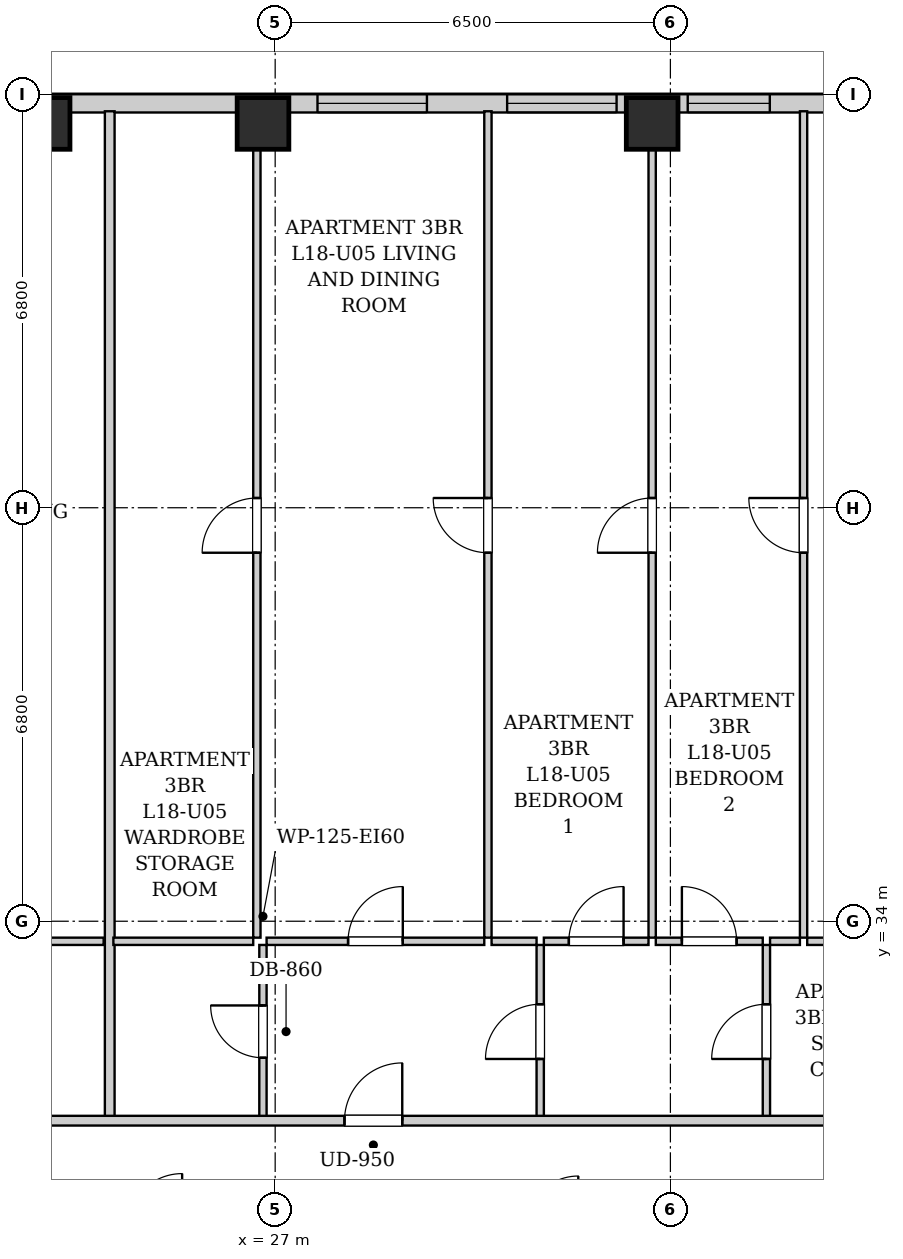
"""IFC4 building model, lengths in metres.
Left out: names, types, materials, properties, quantities, classifications, styles, units other than length and angle.
Written with IfcOpenShell. Run it as: python <this file> out.ifc"""

import sys

from ifc_helpers import new_model, si_unit, direction, frame, frame_2d, origin, origin_2d, place, context, subcontext, project, spatial, rectangle, extrude, element, fill, save


model = new_model("IFC4")
c1 = context("Model", 3, precision=1e-05, world=origin(), true_north=direction((0.0, 1.0)))
c2 = subcontext(c1, "Body", "Model", "MODEL_VIEW")
j1 = project(units=[si_unit("LENGTHUNIT", "METRE"), si_unit("PLANEANGLEUNIT", "RADIAN")], contexts=[c1])
p1 = place(None, origin())
s1 = spatial("IfcSite", under=j1, at=p1, CompositionType="ELEMENT")
p2 = place(p1, origin())
s2 = spatial("IfcBuilding", under=s1, at=p2, CompositionType="ELEMENT")
p3 = place(p2, frame((0.0, 0.0, 67.4)))
s3 = spatial("IfcBuildingStorey", under=s2, at=p3, CompositionType="ELEMENT", Elevation=67.4)
for number, where, z_axis, x_axis in (
    (1, (23.2, 47.12, 0.0), (0.0, 0.0, 1.0), (1.0, 0.0, 0.0)),
    (2, (26.8, 47.12, 0.0), (0.0, 0.0, 1.0), (1.0, 0.0, 0.0)),
    (3, (33.2, 47.12, 0.0), (0.0, 0.0, 1.0), (1.0, 0.0, 0.0)),
):
    element("IfcColumn", number, at=place(p3, frame(where, z_axis=z_axis, x_axis=x_axis)), inside=s3, PredefinedType="COLUMN", context=c2, shape_type="SweptSolid", body=[
        extrude(rectangle(XDim=0.85, YDim=0.85, at=origin_2d()), origin(), (0.0, 0.0, 1.0), 3.2),
    ])
p4 = place(p3, frame((10.0, 47.45, 0.0), z_axis=(0.0, 0.0, 1.0), x_axis=(1.0, 0.0, 0.0)))
e4 = element("IfcWall", 4, at=p4, inside=s3, PredefinedType="SOLIDWALL", context=c2, shape_type="SweptSolid", body=[
    extrude(rectangle(XDim=26.35, YDim=0.3, at=frame_2d((13.175, 0.0))), origin(), (0.0, 0.0, 1.0), 1.915),
])
p5 = place(p4, frame((1.735, 0.0, 0.55)))
e5 = element("IfcOpeningElement", 5, at=p5, cuts=e4, PredefinedType="OPENING", context=c2, shape_type="SweptSolid", body=[
    extrude(rectangle(XDim=1.8, YDim=1.2, at=frame_2d((0.9, 0.6))), frame((0.0, 0.16, 0.0), z_axis=(0.0, -1.0, 0.0), x_axis=(1.0, 0.0, 0.0)), (0.0, 0.0, 1.0), 0.32),
])
p6 = place(p4, frame((5.415, 0.0, 0.55)))
e6 = element("IfcOpeningElement", 6, at=p6, cuts=e4, PredefinedType="OPENING", context=c2, shape_type="SweptSolid", body=[
    extrude(rectangle(XDim=1.8, YDim=1.2, at=frame_2d((0.9, 0.6))), frame((0.0, 0.16, 0.0), z_axis=(0.0, -1.0, 0.0), x_axis=(1.0, 0.0, 0.0)), (0.0, 0.0, 1.0), 0.32),
])
p7 = place(p4, frame((10.618, 0.0, 0.55)))
e7 = element("IfcOpeningElement", 7, at=p7, cuts=e4, PredefinedType="OPENING", context=c2, shape_type="SweptSolid", body=[
    extrude(rectangle(XDim=1.8, YDim=1.2, at=frame_2d((0.9, 0.6))), frame((0.0, 0.16, 0.0), z_axis=(0.0, -1.0, 0.0), x_axis=(1.0, 0.0, 0.0)), (0.0, 0.0, 1.0), 0.32),
])
p8 = place(p4, frame((17.696, 0.0, 0.55)))
e8 = element("IfcOpeningElement", 8, at=p8, cuts=e4, PredefinedType="OPENING", context=c2, shape_type="SweptSolid", body=[
    extrude(rectangle(XDim=1.8, YDim=1.2, at=frame_2d((0.9, 0.6))), frame((0.0, 0.16, 0.0), z_axis=(0.0, -1.0, 0.0), x_axis=(1.0, 0.0, 0.0)), (0.0, 0.0, 1.0), 0.32),
])
p9 = place(p4, frame((20.815, 0.0, 0.55)))
e9 = element("IfcOpeningElement", 9, at=p9, cuts=e4, PredefinedType="OPENING", context=c2, shape_type="SweptSolid", body=[
    extrude(rectangle(XDim=1.8, YDim=1.2, at=frame_2d((0.9, 0.6))), frame((0.0, 0.16, 0.0), z_axis=(0.0, -1.0, 0.0), x_axis=(1.0, 0.0, 0.0)), (0.0, 0.0, 1.0), 0.32),
])
p10 = place(p4, frame((23.785, 0.0, 0.55)))
e10 = element("IfcOpeningElement", 10, at=p10, cuts=e4, PredefinedType="OPENING", context=c2, shape_type="SweptSolid", body=[
    extrude(rectangle(XDim=1.35, YDim=1.2, at=frame_2d((0.675, 0.6))), frame((0.0, 0.16, 0.0), z_axis=(0.0, -1.0, 0.0), x_axis=(1.0, 0.0, 0.0)), (0.0, 0.0, 1.0), 0.32),
])
p11 = place(p3, frame((20.826, 33.67, 0.0), z_axis=(0.0, 0.0, 1.0), x_axis=(1.0, 0.0, 0.0)))
e11 = element("IfcWall", 11, at=p11, inside=s3, PredefinedType="PARTITIONING", context=c2, shape_type="SweptSolid", body=[
    extrude(rectangle(XDim=3.353, YDim=0.12, at=frame_2d((1.677, 0.0))), origin(), (0.0, 0.0, 1.0), 2.88),
])
p12 = place(p11, frame((1.226, 0.0, 0.0)))
e12 = element("IfcOpeningElement", 12, at=p12, cuts=e11, PredefinedType="OPENING", context=c2, shape_type="SweptSolid", body=[
    extrude(rectangle(XDim=0.9, YDim=2.05, at=frame_2d((0.45, 1.025))), frame((0.0, 0.07, 0.0), z_axis=(0.0, -1.0, 0.0), x_axis=(1.0, 0.0, 0.0)), (0.0, 0.0, 1.0), 0.14),
])
p13 = place(p3, frame((24.279, 30.76, 0.0), z_axis=(0.0, 0.0, 1.0), x_axis=(0.0, 1.0, 0.0)))
e13 = element("IfcWall", 13, at=p13, inside=s3, PredefinedType="PARTITIONING", context=c2, shape_type="SweptSolid", body=[
    extrude(rectangle(XDim=16.56, YDim=0.16, at=frame_2d((8.28, 0.0))), origin(), (0.0, 0.0, 1.0), 2.88),
])
p14 = place(p3, frame((26.799, 30.76, 0.0), z_axis=(0.0, 0.0, 1.0), x_axis=(0.0, 1.0, 0.0)))
e14 = element("IfcWall", 14, at=p14, inside=s3, PredefinedType="PARTITIONING", context=c2, shape_type="SweptSolid", body=[
    extrude(rectangle(XDim=2.85, YDim=0.12, at=frame_2d((1.425, 0.0))), origin(), (0.0, 0.0, 1.0), 2.88),
])
p15 = place(p14, frame((0.995, 0.0, 0.0)))
e15 = element("IfcOpeningElement", 15, at=p15, cuts=e14, PredefinedType="OPENING", context=c2, shape_type="SweptSolid", body=[
    extrude(rectangle(XDim=0.86, YDim=2.05, at=frame_2d((0.43, 1.025))), frame((0.0, 0.07, 0.0), z_axis=(0.0, -1.0, 0.0), x_axis=(1.0, 0.0, 0.0)), (0.0, 0.0, 1.0), 0.14),
])
p16 = place(p3, frame((24.339, 33.67, 0.0), z_axis=(0.0, 0.0, 1.0), x_axis=(1.0, 0.0, 0.0)))
e16 = element("IfcWall", 16, at=p16, inside=s3, PredefinedType="PARTITIONING", context=c2, shape_type="SweptSolid", body=[
    extrude(rectangle(XDim=2.3, YDim=0.12, at=frame_2d((1.15, 0.0))), origin(), (0.0, 0.0, 1.0), 2.88),
])
p17 = place(p3, frame((31.359, 30.76, 0.0), z_axis=(0.0, 0.0, 1.0), x_axis=(0.0, 1.0, 0.0)))
e17 = element("IfcWall", 17, at=p17, inside=s3, PredefinedType="PARTITIONING", context=c2, shape_type="SweptSolid", body=[
    extrude(rectangle(XDim=2.85, YDim=0.12, at=frame_2d((1.425, 0.0))), origin(), (0.0, 0.0, 1.0), 2.88),
])
p18 = place(p17, frame((0.975, 0.0, 0.0)))
e18 = element("IfcOpeningElement", 18, at=p18, cuts=e17, PredefinedType="OPENING", context=c2, shape_type="SweptSolid", body=[
    extrude(rectangle(XDim=0.9, YDim=2.05, at=frame_2d((0.45, 1.025))), frame((0.0, 0.07, 0.0), z_axis=(0.0, -1.0, 0.0), x_axis=(1.0, 0.0, 0.0)), (0.0, 0.0, 1.0), 0.14),
])
p19 = place(p3, frame((26.859, 33.67, 0.0), z_axis=(0.0, 0.0, 1.0), x_axis=(1.0, 0.0, 0.0)))
e19 = element("IfcWall", 19, at=p19, inside=s3, PredefinedType="PARTITIONING", context=c2, shape_type="SweptSolid", body=[
    extrude(rectangle(XDim=3.58, YDim=0.12, at=frame_2d((1.79, 0.0))), origin(), (0.0, 0.0, 1.0), 2.88),
])
p20 = place(p19, frame((1.34, 0.0, 0.0)))
e20 = element("IfcOpeningElement", 20, at=p20, cuts=e19, PredefinedType="OPENING", context=c2, shape_type="SweptSolid", body=[
    extrude(rectangle(XDim=0.9, YDim=2.05, at=frame_2d((0.45, 1.025))), frame((0.0, 0.07, 0.0), z_axis=(0.0, -1.0, 0.0), x_axis=(1.0, 0.0, 0.0)), (0.0, 0.0, 1.0), 0.14),
])
p21 = place(p3, frame((30.559, 33.67, 0.0), z_axis=(0.0, 0.0, 1.0), x_axis=(1.0, 0.0, 0.0)))
e21 = element("IfcWall", 21, at=p21, inside=s3, PredefinedType="PARTITIONING", context=c2, shape_type="SweptSolid", body=[
    extrude(rectangle(XDim=0.74, YDim=0.12, at=frame_2d((0.37, 0.0))), origin(), (0.0, 0.0, 1.0), 2.88),
])
p22 = place(p3, frame((35.079, 30.76, 0.0), z_axis=(0.0, 0.0, 1.0), x_axis=(0.0, 1.0, 0.0)))
e22 = element("IfcWall", 22, at=p22, inside=s3, PredefinedType="PARTITIONING", context=c2, shape_type="SweptSolid", body=[
    extrude(rectangle(XDim=2.85, YDim=0.12, at=frame_2d((1.425, 0.0))), origin(), (0.0, 0.0, 1.0), 2.88),
])
p23 = place(p22, frame((0.975, 0.0, 0.0)))
e23 = element("IfcOpeningElement", 23, at=p23, cuts=e22, PredefinedType="OPENING", context=c2, shape_type="SweptSolid", body=[
    extrude(rectangle(XDim=0.9, YDim=2.05, at=frame_2d((0.45, 1.025))), frame((0.0, 0.07, 0.0), z_axis=(0.0, -1.0, 0.0), x_axis=(1.0, 0.0, 0.0)), (0.0, 0.0, 1.0), 0.14),
])
p24 = place(p3, frame((31.419, 33.67, 0.0), z_axis=(0.0, 0.0, 1.0), x_axis=(1.0, 0.0, 0.0)))
e24 = element("IfcWall", 24, at=p24, inside=s3, PredefinedType="PARTITIONING", context=c2, shape_type="SweptSolid", body=[
    extrude(rectangle(XDim=1.721, YDim=0.12, at=frame_2d((0.86, 0.0))), origin(), (0.0, 0.0, 1.0), 2.88),
])
p25 = place(p24, frame((0.411, 0.0, 0.0)))
e25 = element("IfcOpeningElement", 25, at=p25, cuts=e24, PredefinedType="OPENING", context=c2, shape_type="SweptSolid", body=[
    extrude(rectangle(XDim=0.9, YDim=2.05, at=frame_2d((0.45, 1.025))), frame((0.0, 0.07, 0.0), z_axis=(0.0, -1.0, 0.0), x_axis=(1.0, 0.0, 0.0)), (0.0, 0.0, 1.0), 0.14),
])
p26 = place(p3, frame((33.26, 33.67, 0.0), z_axis=(0.0, 0.0, 1.0), x_axis=(1.0, 0.0, 0.0)))
e26 = element("IfcWall", 26, at=p26, inside=s3, PredefinedType="PARTITIONING", context=c2, shape_type="SweptSolid", body=[
    extrude(rectangle(XDim=1.759, YDim=0.12, at=frame_2d((0.879, 0.0))), origin(), (0.0, 0.0, 1.0), 2.88),
])
p27 = place(p26, frame((0.429, 0.0, 0.0)))
e27 = element("IfcOpeningElement", 27, at=p27, cuts=e26, PredefinedType="OPENING", context=c2, shape_type="SweptSolid", body=[
    extrude(rectangle(XDim=0.9, YDim=2.05, at=frame_2d((0.45, 1.025))), frame((0.0, 0.07, 0.0), z_axis=(0.0, -1.0, 0.0), x_axis=(1.0, 0.0, 0.0)), (0.0, 0.0, 1.0), 0.14),
])
p28 = place(p3, frame((35.139, 33.67, 0.0), z_axis=(0.0, 0.0, 1.0), x_axis=(1.0, 0.0, 0.0)))
e28 = element("IfcWall", 28, at=p28, inside=s3, PredefinedType="PARTITIONING", context=c2, shape_type="SweptSolid", body=[
    extrude(rectangle(XDim=0.491, YDim=0.12, at=frame_2d((0.246, 0.0))), origin(), (0.0, 0.0, 1.0), 2.88),
])
p29 = place(p3, frame((35.75, 33.67, 0.0), z_axis=(0.0, 0.0, 1.0), x_axis=(1.0, 0.0, 0.0)))
e29 = element("IfcWall", 29, at=p29, inside=s3, PredefinedType="PARTITIONING", context=c2, shape_type="SweptSolid", body=[
    extrude(rectangle(XDim=2.37, YDim=0.12, at=frame_2d((1.185, 0.0))), origin(), (0.0, 0.0, 1.0), 2.88),
])
p30 = place(p29, frame((0.735, 0.0, 0.0)))
e30 = element("IfcOpeningElement", 30, at=p30, cuts=e29, PredefinedType="OPENING", context=c2, shape_type="SweptSolid", body=[
    extrude(rectangle(XDim=0.9, YDim=2.05, at=frame_2d((0.45, 1.025))), frame((0.0, 0.07, 0.0), z_axis=(0.0, -1.0, 0.0), x_axis=(1.0, 0.0, 0.0)), (0.0, 0.0, 1.0), 0.14),
])
p31 = place(p3, frame((26.699, 33.73, 0.0), z_axis=(0.0, 0.0, 1.0), x_axis=(0.0, 1.0, 0.0)))
e31 = element("IfcWall", 31, at=p31, inside=s3, PredefinedType="PARTITIONING", context=c2, shape_type="SweptSolid", body=[
    extrude(rectangle(XDim=13.59, YDim=0.12, at=frame_2d((6.795, 0.0))), origin(), (0.0, 0.0, 1.0), 2.88),
])
p32 = place(p31, frame((6.33, 0.0, 0.0)))
e32 = element("IfcOpeningElement", 32, at=p32, cuts=e31, PredefinedType="OPENING", context=c2, shape_type="SweptSolid", body=[
    extrude(rectangle(XDim=0.9, YDim=2.05, at=frame_2d((0.45, 1.025))), frame((0.0, 0.07, 0.0), z_axis=(0.0, -1.0, 0.0), x_axis=(1.0, 0.0, 0.0)), (0.0, 0.0, 1.0), 0.14),
])
p33 = place(p3, frame((30.499, 33.73, 0.0), z_axis=(0.0, 0.0, 1.0), x_axis=(0.0, 1.0, 0.0)))
e33 = element("IfcWall", 33, at=p33, inside=s3, PredefinedType="PARTITIONING", context=c2, shape_type="SweptSolid", body=[
    extrude(rectangle(XDim=13.59, YDim=0.12, at=frame_2d((6.795, 0.0))), origin(), (0.0, 0.0, 1.0), 2.88),
])
p34 = place(p33, frame((6.33, 0.0, 0.0)))
e34 = element("IfcOpeningElement", 34, at=p34, cuts=e33, PredefinedType="OPENING", context=c2, shape_type="SweptSolid", body=[
    extrude(rectangle(XDim=0.9, YDim=2.05, at=frame_2d((0.45, 1.025))), frame((0.0, 0.07, 0.0), z_axis=(0.0, -1.0, 0.0), x_axis=(1.0, 0.0, 0.0)), (0.0, 0.0, 1.0), 0.14),
])
p35 = place(p3, frame((33.2, 33.73, 0.0), z_axis=(0.0, 0.0, 1.0), x_axis=(0.0, 1.0, 0.0)))
e35 = element("IfcWall", 35, at=p35, inside=s3, PredefinedType="PARTITIONING", context=c2, shape_type="SweptSolid", body=[
    extrude(rectangle(XDim=13.59, YDim=0.12, at=frame_2d((6.795, 0.0))), origin(), (0.0, 0.0, 1.0), 2.172),
])
p36 = place(p35, frame((6.33, 0.0, 0.0)))
e36 = element("IfcOpeningElement", 36, at=p36, cuts=e35, PredefinedType="OPENING", context=c2, shape_type="SweptSolid", body=[
    extrude(rectangle(XDim=0.9, YDim=2.05, at=frame_2d((0.45, 1.025))), frame((0.0, 0.07, 0.0), z_axis=(0.0, -1.0, 0.0), x_axis=(1.0, 0.0, 0.0)), (0.0, 0.0, 1.0), 0.14),
])
p37 = place(p3, frame((35.69, 33.73, 0.0), z_axis=(0.0, 0.0, 1.0), x_axis=(0.0, 1.0, 0.0)))
e37 = element("IfcWall", 37, at=p37, inside=s3, PredefinedType="PARTITIONING", context=c2, shape_type="SweptSolid", body=[
    extrude(rectangle(XDim=13.59, YDim=0.12, at=frame_2d((6.795, 0.0))), origin(), (0.0, 0.0, 1.0), 2.88),
])
p38 = place(p37, frame((6.33, 0.0, 0.0)))
e38 = element("IfcOpeningElement", 38, at=p38, cuts=e37, PredefinedType="OPENING", context=c2, shape_type="SweptSolid", body=[
    extrude(rectangle(XDim=0.9, YDim=2.05, at=frame_2d((0.45, 1.025))), frame((0.0, 0.07, 0.0), z_axis=(0.0, -1.0, 0.0), x_axis=(1.0, 0.0, 0.0)), (0.0, 0.0, 1.0), 0.14),
])
p39 = place(p3, frame((10.05, 30.72, 0.0), z_axis=(0.0, 0.0, 1.0), x_axis=(1.0, 0.0, 0.0)))
e39 = element("IfcWall", 39, at=p39, inside=s3, PredefinedType="PARTITIONING", context=c2, shape_type="SweptSolid", body=[
    extrude(rectangle(XDim=33.9, YDim=0.16, at=frame_2d((16.95, 0.0))), origin(), (0.0, 0.0, 1.0), 2.88),
])
p40 = place(p39, frame((3.8, 0.0, 0.0)))
e40 = element("IfcOpeningElement", 40, at=p40, cuts=e39, PredefinedType="OPENING", context=c2, shape_type="SweptSolid", body=[
    extrude(rectangle(XDim=0.95, YDim=2.1, at=frame_2d((0.475, 1.05))), frame((0.0, 0.09, 0.0), z_axis=(0.0, -1.0, 0.0), x_axis=(1.0, 0.0, 0.0)), (0.0, 0.0, 1.0), 0.18),
])
p41 = place(p39, frame((11.977, 0.0, 0.0)))
e41 = element("IfcOpeningElement", 41, at=p41, cuts=e39, PredefinedType="OPENING", context=c2, shape_type="SweptSolid", body=[
    extrude(rectangle(XDim=0.95, YDim=2.1, at=frame_2d((0.475, 1.05))), frame((0.0, 0.09, 0.0), z_axis=(0.0, -1.0, 0.0), x_axis=(1.0, 0.0, 0.0)), (0.0, 0.0, 1.0), 0.18),
])
p42 = place(p39, frame((18.09, 0.0, 0.0)))
e42 = element("IfcOpeningElement", 42, at=p42, cuts=e39, PredefinedType="OPENING", context=c2, shape_type="SweptSolid", body=[
    extrude(rectangle(XDim=0.95, YDim=2.1, at=frame_2d((0.475, 1.05))), frame((0.0, 0.09, 0.0), z_axis=(0.0, -1.0, 0.0), x_axis=(1.0, 0.0, 0.0)), (0.0, 0.0, 1.0), 0.18),
])
p43 = place(p39, frame((31.525, 0.0, 0.0)))
e43 = element("IfcOpeningElement", 43, at=p43, cuts=e39, PredefinedType="OPENING", context=c2, shape_type="SweptSolid", body=[
    extrude(rectangle(XDim=0.95, YDim=2.1, at=frame_2d((0.475, 1.05))), frame((0.0, 0.09, 0.0), z_axis=(0.0, -1.0, 0.0), x_axis=(1.0, 0.0, 0.0)), (0.0, 0.0, 1.0), 0.18),
])
p44 = place(p15, origin())
e44 = element("IfcDoor", 44, at=p44, inside=s3, OperationType="SINGLE_SWING_RIGHT", PredefinedType="DOOR", context=c2, shape_type="SweptSolid", body=[
    extrude(rectangle(XDim=0.86, YDim=2.05, at=frame_2d((0.43, 1.025))), frame((0.0, 0.025, 0.0), z_axis=(0.0, -1.0, 0.0), x_axis=(1.0, 0.0, 0.0)), (0.0, 0.0, 1.0), 0.05),
])
fill(e15, e44)
p45 = place(p18, origin())
e45 = element("IfcDoor", 45, at=p45, inside=s3, OperationType="SINGLE_SWING_LEFT", PredefinedType="DOOR", context=c2, shape_type="SweptSolid", body=[
    extrude(rectangle(XDim=0.9, YDim=2.05, at=frame_2d((0.45, 1.025))), frame((0.0, 0.025, 0.0), z_axis=(0.0, -1.0, 0.0), x_axis=(1.0, 0.0, 0.0)), (0.0, 0.0, 1.0), 0.05),
])
fill(e18, e45)
p46 = place(p20, origin())
e46 = element("IfcDoor", 46, at=p46, inside=s3, OperationType="SINGLE_SWING_RIGHT", PredefinedType="DOOR", context=c2, shape_type="SweptSolid", body=[
    extrude(rectangle(XDim=0.9, YDim=2.05, at=frame_2d((0.45, 1.025))), frame((0.0, 0.025, 0.0), z_axis=(0.0, -1.0, 0.0), x_axis=(1.0, 0.0, 0.0)), (0.0, 0.0, 1.0), 0.05),
])
fill(e20, e46)
p47 = place(p23, origin())
e47 = element("IfcDoor", 47, at=p47, inside=s3, OperationType="SINGLE_SWING_LEFT", PredefinedType="DOOR", context=c2, shape_type="SweptSolid", body=[
    extrude(rectangle(XDim=0.9, YDim=2.05, at=frame_2d((0.45, 1.025))), frame((0.0, 0.025, 0.0), z_axis=(0.0, -1.0, 0.0), x_axis=(1.0, 0.0, 0.0)), (0.0, 0.0, 1.0), 0.05),
])
fill(e23, e47)
p48 = place(p25, origin())
e48 = element("IfcDoor", 48, at=p48, inside=s3, OperationType="SINGLE_SWING_RIGHT", PredefinedType="DOOR", context=c2, shape_type="SweptSolid", body=[
    extrude(rectangle(XDim=0.9, YDim=2.05, at=frame_2d((0.45, 1.025))), frame((0.0, 0.025, 0.0), z_axis=(0.0, -1.0, 0.0), x_axis=(1.0, 0.0, 0.0)), (0.0, 0.0, 1.0), 0.05),
])
fill(e25, e48)
p49 = place(p27, origin())
e49 = element("IfcDoor", 49, at=p49, inside=s3, OperationType="SINGLE_SWING_LEFT", PredefinedType="DOOR", context=c2, shape_type="SweptSolid", body=[
    extrude(rectangle(XDim=0.9, YDim=2.05, at=frame_2d((0.45, 1.025))), frame((0.0, 0.025, 0.0), z_axis=(0.0, -1.0, 0.0), x_axis=(1.0, 0.0, 0.0)), (0.0, 0.0, 1.0), 0.05),
])
fill(e27, e49)
p50 = place(p32, origin())
e50 = element("IfcDoor", 50, at=p50, inside=s3, OperationType="SINGLE_SWING_LEFT", PredefinedType="DOOR", context=c2, shape_type="SweptSolid", body=[
    extrude(rectangle(XDim=0.9, YDim=2.05, at=frame_2d((0.45, 1.025))), frame((0.0, 0.025, 0.0), z_axis=(0.0, -1.0, 0.0), x_axis=(1.0, 0.0, 0.0)), (0.0, 0.0, 1.0), 0.05),
])
fill(e32, e50)
p51 = place(p34, origin())
e51 = element("IfcDoor", 51, at=p51, inside=s3, OperationType="SINGLE_SWING_RIGHT", PredefinedType="DOOR", context=c2, shape_type="SweptSolid", body=[
    extrude(rectangle(XDim=0.9, YDim=2.05, at=frame_2d((0.45, 1.025))), frame((0.0, 0.025, 0.0), z_axis=(0.0, -1.0, 0.0), x_axis=(1.0, 0.0, 0.0)), (0.0, 0.0, 1.0), 0.05),
])
fill(e34, e51)
p52 = place(p36, origin())
e52 = element("IfcDoor", 52, at=p52, inside=s3, OperationType="SINGLE_SWING_LEFT", PredefinedType="DOOR", context=c2, shape_type="SweptSolid", body=[
    extrude(rectangle(XDim=0.9, YDim=2.05, at=frame_2d((0.45, 1.025))), frame((0.0, 0.025, 0.0), z_axis=(0.0, -1.0, 0.0), x_axis=(1.0, 0.0, 0.0)), (0.0, 0.0, 1.0), 0.05),
])
fill(e36, e52)
p53 = place(p38, origin())
e53 = element("IfcDoor", 53, at=p53, inside=s3, OperationType="SINGLE_SWING_RIGHT", PredefinedType="DOOR", context=c2, shape_type="SweptSolid", body=[
    extrude(rectangle(XDim=0.9, YDim=2.05, at=frame_2d((0.45, 1.025))), frame((0.0, 0.025, 0.0), z_axis=(0.0, -1.0, 0.0), x_axis=(1.0, 0.0, 0.0)), (0.0, 0.0, 1.0), 0.05),
])
fill(e38, e53)
p54 = place(p42, origin())
e54 = element("IfcDoor", 54, at=p54, inside=s3, OperationType="SINGLE_SWING_RIGHT", PredefinedType="DOOR", context=c2, shape_type="SweptSolid", body=[
    extrude(rectangle(XDim=0.95, YDim=2.1, at=frame_2d((0.475, 1.05))), frame((0.0, 0.025, 0.0), z_axis=(0.0, -1.0, 0.0), x_axis=(1.0, 0.0, 0.0)), (0.0, 0.0, 1.0), 0.05),
])
fill(e42, e54)
p55 = place(p8, origin())
e55 = element("IfcWindow", 55, at=p55, inside=s3, PartitioningType="DOUBLE_PANEL_VERTICAL", PredefinedType="WINDOW", context=c2, shape_type="SweptSolid", body=[
    extrude(rectangle(XDim=1.8, YDim=1.2, at=frame_2d((0.9, 0.6))), frame((0.0, 0.03, 0.0), z_axis=(0.0, -1.0, 0.0), x_axis=(1.0, 0.0, 0.0)), (0.0, 0.0, 1.0), 0.06),
])
fill(e8, e55)
p56 = place(p9, origin())
e56 = element("IfcWindow", 56, at=p56, inside=s3, PartitioningType="DOUBLE_PANEL_VERTICAL", PredefinedType="WINDOW", context=c2, shape_type="SweptSolid", body=[
    extrude(rectangle(XDim=1.8, YDim=1.2, at=frame_2d((0.9, 0.6))), frame((0.0, 0.03, 0.0), z_axis=(0.0, -1.0, 0.0), x_axis=(1.0, 0.0, 0.0)), (0.0, 0.0, 1.0), 0.06),
])
fill(e9, e56)
p57 = place(p10, origin())
e57 = element("IfcWindow", 57, at=p57, inside=s3, PartitioningType="SINGLE_PANEL", PredefinedType="WINDOW", context=c2, shape_type="SweptSolid", body=[
    extrude(rectangle(XDim=1.35, YDim=1.2, at=frame_2d((0.675, 0.6))), frame((0.0, 0.03, 0.0), z_axis=(0.0, -1.0, 0.0), x_axis=(1.0, 0.0, 0.0)), (0.0, 0.0, 1.0), 0.06),
])
fill(e10, e57)
save(model, sys.argv[1])
